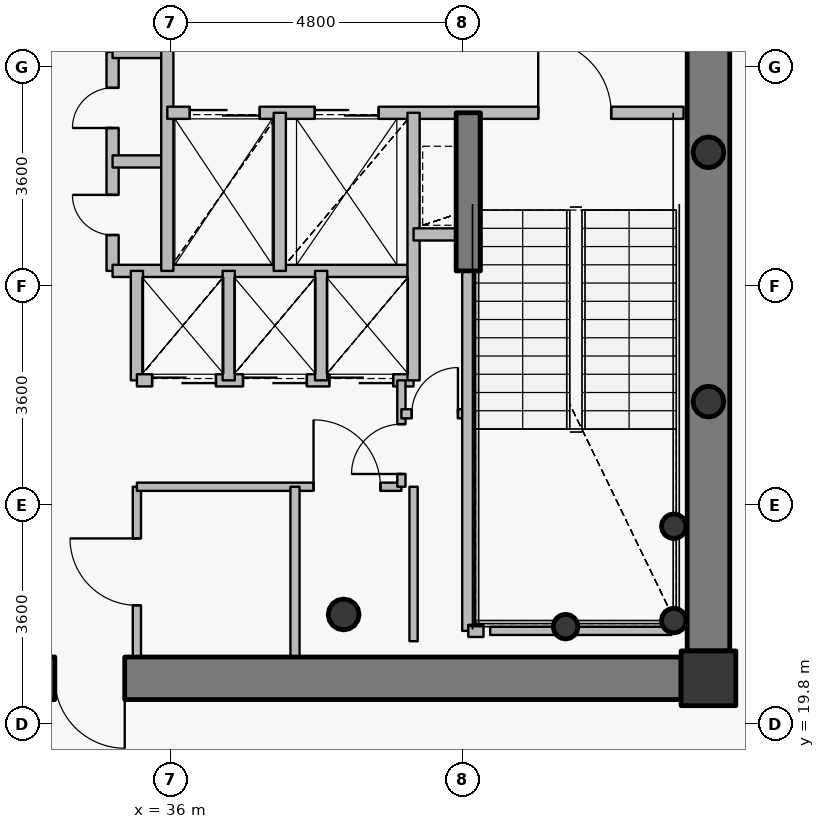
"""IFC4 building model, lengths in metres.
Left out: names, types, materials, properties, quantities, classifications, styles, units other than length and angle.
Written with IfcOpenShell. Run it as: python <this file> out.ifc"""

import sys

from ifc_helpers import new_model, si_unit, direction, frame, frame_2d, origin, origin_2d, place, context, subcontext, project, spatial, rectangle, hollow_circle, extrude, source, transform, mapped, element, fill, save


model = new_model("IFC4")
c1 = context("Model", 3, precision=1e-05, world=origin(), true_north=direction((0.0, 1.0)))
c2 = subcontext(c1, "Body", "Model", "MODEL_VIEW")
j1 = project(units=[si_unit("LENGTHUNIT", "METRE"), si_unit("PLANEANGLEUNIT", "RADIAN")], contexts=[c1])
p1 = place(None, origin())
s1 = spatial("IfcSite", under=j1, at=p1, CompositionType="ELEMENT")
p2 = place(p1, origin())
s2 = spatial("IfcBuilding", under=s1, at=p2, CompositionType="ELEMENT")
p3 = place(p2, frame((0.0, 0.0, 339.2)))
s3 = spatial("IfcBuildingStorey", under=s2, at=p3, CompositionType="ELEMENT", Elevation=339.2)
p4 = place(p3, frame((44.85, 20.55, 0.0), z_axis=(0.0, 0.0, 1.0), x_axis=(1.0, 0.0, 0.0)))
e1 = element("IfcColumn", 1, at=p4, inside=s3, PredefinedType="COLUMN", context=c2, shape_type="SweptSolid", body=[
    extrude(rectangle(XDim=0.9, YDim=0.9, at=origin_2d()), origin(), (0.0, 0.0, 1.0), 3.8),
])
p5 = place(p3, frame((38.85, 21.6, 0.0), z_axis=(0.0, 0.0, 1.0), x_axis=(1.0, 0.0, 0.0)))
e2 = element("IfcColumn", 2, at=p5, inside=s3, PredefinedType="COLUMN", context=c2, shape_type="SweptSolid", body=[
    extrude(hollow_circle(Radius=0.254, WallThickness=0.02, at=origin_2d()), origin(), (0.0, 0.0, 1.0), 3.8),
])
for number, where, z_axis, x_axis in (
    (3, (44.28, 21.5, 0.0), (0.0, 0.0, 1.0), (1.0, 0.0, 0.0)),
    (4, (44.28, 23.05, 0.0), (0.0, 0.0, 1.0), (1.0, 0.0, 0.0)),
    (5, (42.5, 21.4, 0.0), (0.0, 0.0, 1.0), (1.0, 0.0, 0.0)),
):
    element("IfcColumn", number, at=place(p3, frame(where, z_axis=z_axis, x_axis=x_axis)), inside=s3, PredefinedType="COLUMN", context=c2, shape_type="SweptSolid", body=[
        extrude(hollow_circle(Radius=0.203, WallThickness=0.016, at=origin_2d()), origin(), (0.0, 0.0, 1.0), 3.8),
    ])
p6 = place(p3, frame((44.85, 33.0, 0.0), z_axis=(0.0, 0.0, 1.0), x_axis=(0.0, -1.0, 0.0)))
e6 = element("IfcWall", 6, at=p6, inside=s3, PredefinedType="SHEAR", context=c2, shape_type="SweptSolid", body=[
    extrude(rectangle(XDim=12.0, YDim=0.7, at=frame_2d((6.0, 0.0))), origin(), (0.0, 0.0, 1.0), 3.1),
])
p7 = place(p3, frame((44.4, 20.55, 0.0), z_axis=(0.0, 0.0, 1.0), x_axis=(-1.0, 0.0, 0.0)))
e7 = element("IfcWall", 7, at=p7, inside=s3, PredefinedType="SHEAR", context=c2, shape_type="SweptSolid", body=[
    extrude(rectangle(XDim=16.8, YDim=0.7, at=frame_2d((8.4, 0.0))), origin(), (0.0, 0.0, 1.0), 3.1),
])
p8 = place(p7, frame((13.0, 0.0, 0.0)))
e8 = element("IfcOpeningElement", 8, at=p8, cuts=e7, PredefinedType="OPENING", context=c2, shape_type="SweptSolid", body=[
    extrude(rectangle(XDim=1.15, YDim=2.15, at=origin_2d()), frame((0.575, 0.36, 1.075), z_axis=(0.0, -1.0, 0.0), x_axis=(1.0, 0.0, 0.0)), (0.0, 0.0, 1.0), 0.72),
])
p9 = place(p7, frame((9.15, 0.0, 0.0)))
e9 = element("IfcOpeningElement", 9, at=p9, cuts=e7, PredefinedType="OPENING", context=c2, shape_type="SweptSolid", body=[
    extrude(rectangle(XDim=1.15, YDim=2.15, at=origin_2d()), frame((0.575, 0.36, 1.075), z_axis=(0.0, -1.0, 0.0), x_axis=(1.0, 0.0, 0.0)), (0.0, 0.0, 1.0), 0.72),
])
p10 = place(p3, frame((40.9, 27.25, 0.0), z_axis=(0.0, 0.0, 1.0), x_axis=(0.0, 1.0, 0.0)))
e10 = element("IfcWall", 10, at=p10, inside=s3, PredefinedType="SHEAR", context=c2, shape_type="SweptSolid", body=[
    extrude(rectangle(XDim=2.6, YDim=0.4, at=frame_2d((1.3, 0.0))), origin(), (0.0, 0.0, 1.0), 3.15),
])
for number, where, z_axis, x_axis in (
    (11, (44.85, 25.1, 0.0), (0.0, 0.0, 1.0), (1.0, 0.0, 0.0)),
    (12, (44.85, 29.2, 0.0), (0.0, 0.0, 1.0), (1.0, 0.0, 0.0)),
):
    element("IfcColumn", number, at=place(p3, frame(where, z_axis=z_axis, x_axis=x_axis)), inside=s3, PredefinedType="COLUMN", context=c2, shape_type="SweptSolid", body=[
        extrude(hollow_circle(Radius=0.254, WallThickness=0.02, at=origin_2d()), origin(), (0.0, 0.0, 1.0), 3.8),
    ])
p11 = place(p3, frame((35.05, 27.25, 0.0), z_axis=(0.0, 0.0, 1.0), x_axis=(0.0, 1.0, 0.0)))
e13 = element("IfcWall", 13, at=p11, inside=s3, PredefinedType="PARTITIONING", context=c2, shape_type="SweptSolid", body=[
    extrude(rectangle(XDim=3.6, YDim=0.2, at=frame_2d((1.8, 0.0))), origin(), (0.0, 0.0, 1.0), 3.55),
])
p12 = place(p11, frame((0.59, 0.0, 0.0)))
e14 = element("IfcOpeningElement", 14, at=p12, cuts=e13, PredefinedType="OPENING", context=c2, shape_type="SweptSolid", body=[
    extrude(rectangle(XDim=0.66, YDim=2.05, at=origin_2d()), frame((0.33, 0.11, 1.025), z_axis=(0.0, -1.0, 0.0), x_axis=(1.0, 0.0, 0.0)), (0.0, 0.0, 1.0), 0.22),
])
p13 = place(p11, frame((2.35, 0.0, 0.0)))
e15 = element("IfcOpeningElement", 15, at=p13, cuts=e13, PredefinedType="OPENING", context=c2, shape_type="SweptSolid", body=[
    extrude(rectangle(XDim=0.66, YDim=2.05, at=origin_2d()), frame((0.33, 0.11, 1.025), z_axis=(0.0, -1.0, 0.0), x_axis=(1.0, 0.0, 0.0)), (0.0, 0.0, 1.0), 0.22),
])
p14 = place(p3, frame((35.05, 27.25, 0.0), z_axis=(0.0, 0.0, 1.0), x_axis=(1.0, 0.0, 0.0)))
e16 = element("IfcWall", 16, at=p14, inside=s3, PredefinedType="PARTITIONING", context=c2, shape_type="SweptSolid", body=[
    extrude(rectangle(XDim=4.95, YDim=0.2, at=frame_2d((2.475, 0.0))), origin(), (0.0, 0.0, 1.0), 3.135),
])
for number, where, z_axis, x_axis in (
    (17, (35.05, 29.05, 0.0), (0.0, 0.0, 1.0), (1.0, 0.0, 0.0)),
    (18, (35.05, 30.85, 0.0), (0.0, 0.0, 1.0), (1.0, 0.0, 0.0)),
):
    element("IfcWall", number, at=place(p3, frame(where, z_axis=z_axis, x_axis=x_axis)), inside=s3, PredefinedType="PARTITIONING", context=c2, shape_type="SweptSolid", body=[
        extrude(rectangle(XDim=0.9, YDim=0.2, at=frame_2d((0.45, 0.0))), origin(), (0.0, 0.0, 1.0), 3.55),
    ])
p15 = place(p3, frame((35.45, 20.9, 0.0), z_axis=(0.0, 0.0, 1.0), x_axis=(0.0, 1.0, 0.0)))
e19 = element("IfcWall", 19, at=p15, inside=s3, PredefinedType="PARTITIONING", context=c2, shape_type="SweptSolid", body=[
    extrude(rectangle(XDim=2.8, YDim=0.135, at=frame_2d((1.4, 0.0))), origin(), (0.0, 0.0, 1.0), 3.135),
])
p16 = place(p15, frame((0.85, 0.0, 0.0)))
e20 = element("IfcOpeningElement", 20, at=p16, cuts=e19, PredefinedType="OPENING", context=c2, shape_type="SweptSolid", body=[
    extrude(rectangle(XDim=1.1, YDim=2.15, at=origin_2d()), frame((0.55, 0.078, 1.075), z_axis=(0.0, -1.0, 0.0), x_axis=(1.0, 0.0, 0.0)), (0.0, 0.0, 1.0), 0.155),
])
p17 = place(p3, frame((35.45, 23.7, 0.0), z_axis=(0.0, 0.0, 1.0), x_axis=(1.0, 0.0, 0.0)))
e21 = element("IfcWall", 21, at=p17, inside=s3, PredefinedType="PARTITIONING", context=c2, shape_type="SweptSolid", body=[
    extrude(rectangle(XDim=4.35, YDim=0.135, at=frame_2d((2.175, 0.0))), origin(), (0.0, 0.0, 1.0), 3.135),
])
p18 = place(p17, frame((2.905, 0.0, 0.0)))
e22 = element("IfcOpeningElement", 22, at=p18, cuts=e21, PredefinedType="OPENING", context=c2, shape_type="SweptSolid", body=[
    extrude(rectangle(XDim=1.1, YDim=2.15, at=origin_2d()), frame((0.55, 0.078, 1.075), z_axis=(0.0, -1.0, 0.0), x_axis=(1.0, 0.0, 0.0)), (0.0, 0.0, 1.0), 0.155),
])
p19 = place(p3, frame((35.45, 25.45, 0.0), z_axis=(0.0, 0.0, 1.0), x_axis=(0.0, 1.0, 0.0)))
e23 = element("IfcWall", 23, at=p19, inside=s3, PredefinedType="PARTITIONING", context=c2, shape_type="SweptSolid", body=[
    extrude(rectangle(XDim=1.8, YDim=0.2, at=frame_2d((0.9, 0.0))), origin(), (0.0, 0.0, 1.0), 3.55),
])
p20 = place(p3, frame((35.45, 25.45, 0.0), z_axis=(0.0, 0.0, 1.0), x_axis=(1.0, 0.0, 0.0)))
e24 = element("IfcWall", 24, at=p20, inside=s3, PredefinedType="PARTITIONING", context=c2, shape_type="SweptSolid", body=[
    extrude(rectangle(XDim=4.55, YDim=0.2, at=frame_2d((2.275, 0.0))), origin(), (0.0, 0.0, 1.0), 3.135),
])
p21 = place(p20, frame((0.25, 0.0, 0.0)))
e25 = element("IfcOpeningElement", 25, at=p21, cuts=e24, PredefinedType="OPENING", context=c2, shape_type="SweptSolid", body=[
    extrude(rectangle(XDim=1.05, YDim=2.15, at=origin_2d()), frame((0.525, 0.11, 1.075), z_axis=(0.0, -1.0, 0.0), x_axis=(1.0, 0.0, 0.0)), (0.0, 0.0, 1.0), 0.22),
])
p22 = place(p20, frame((1.745, 0.0, 0.0)))
e26 = element("IfcOpeningElement", 26, at=p22, cuts=e24, PredefinedType="OPENING", context=c2, shape_type="SweptSolid", body=[
    extrude(rectangle(XDim=1.05, YDim=2.15, at=origin_2d()), frame((0.525, 0.11, 1.075), z_axis=(0.0, -1.0, 0.0), x_axis=(1.0, 0.0, 0.0)), (0.0, 0.0, 1.0), 0.22),
])
p23 = place(p20, frame((3.165, 0.0, 0.0)))
e27 = element("IfcOpeningElement", 27, at=p23, cuts=e24, PredefinedType="OPENING", context=c2, shape_type="SweptSolid", body=[
    extrude(rectangle(XDim=1.05, YDim=2.15, at=origin_2d()), frame((0.525, 0.11, 1.075), z_axis=(0.0, -1.0, 0.0), x_axis=(1.0, 0.0, 0.0)), (0.0, 0.0, 1.0), 0.22),
])
p24 = place(p3, frame((35.95, 27.25, 0.0), z_axis=(0.0, 0.0, 1.0), x_axis=(0.0, 1.0, 0.0)))
e28 = element("IfcWall", 28, at=p24, inside=s3, PredefinedType="PARTITIONING", context=c2, shape_type="SweptSolid", body=[
    extrude(rectangle(XDim=3.8, YDim=0.2, at=frame_2d((1.9, 0.0))), origin(), (0.0, 0.0, 1.0), 3.55),
])
p25 = place(p3, frame((35.95, 29.85, 0.0), z_axis=(0.0, 0.0, 1.0), x_axis=(1.0, 0.0, 0.0)))
e29 = element("IfcWall", 29, at=p25, inside=s3, PredefinedType="PARTITIONING", context=c2, shape_type="SweptSolid", body=[
    extrude(rectangle(XDim=8.49, YDim=0.2, at=frame_2d((4.245, 0.0))), origin(), (0.0, 0.0, 1.0), 3.135),
])
p26 = place(p25, frame((6.1, 0.0, 0.0)))
e30 = element("IfcOpeningElement", 30, at=p26, cuts=e29, PredefinedType="OPENING", context=c2, shape_type="SweptSolid", body=[
    extrude(rectangle(XDim=1.2, YDim=2.15, at=origin_2d()), frame((0.6, 0.11, 1.075), z_axis=(0.0, -1.0, 0.0), x_axis=(1.0, 0.0, 0.0)), (0.0, 0.0, 1.0), 0.22),
])
p27 = place(p25, frame((0.37, 0.0, 0.0)))
e31 = element("IfcOpeningElement", 31, at=p27, cuts=e29, PredefinedType="OPENING", context=c2, shape_type="SweptSolid", body=[
    extrude(rectangle(XDim=1.15, YDim=2.15, at=origin_2d()), frame((0.575, 0.11, 1.075), z_axis=(0.0, -1.0, 0.0), x_axis=(1.0, 0.0, 0.0)), (0.0, 0.0, 1.0), 0.22),
])
p28 = place(p25, frame((2.425, 0.0, 0.0)))
e32 = element("IfcOpeningElement", 32, at=p28, cuts=e29, PredefinedType="OPENING", context=c2, shape_type="SweptSolid", body=[
    extrude(rectangle(XDim=1.05, YDim=2.15, at=origin_2d()), frame((0.525, 0.11, 1.075), z_axis=(0.0, -1.0, 0.0), x_axis=(1.0, 0.0, 0.0)), (0.0, 0.0, 1.0), 0.22),
])
p29 = place(p3, frame((36.96, 25.45, 0.0), z_axis=(0.0, 0.0, 1.0), x_axis=(0.0, 1.0, 0.0)))
e33 = element("IfcWall", 33, at=p29, inside=s3, PredefinedType="PARTITIONING", context=c2, shape_type="SweptSolid", body=[
    extrude(rectangle(XDim=1.8, YDim=0.2, at=frame_2d((0.9, 0.0))), origin(), (0.0, 0.0, 1.0), 3.55),
])
p30 = place(p3, frame((37.8, 27.25, 0.0), z_axis=(0.0, 0.0, 1.0), x_axis=(0.0, 1.0, 0.0)))
e34 = element("IfcWall", 34, at=p30, inside=s3, PredefinedType="PARTITIONING", context=c2, shape_type="SweptSolid", body=[
    extrude(rectangle(XDim=2.6, YDim=0.2, at=frame_2d((1.3, 0.0))), origin(), (0.0, 0.0, 1.0), 3.55),
])
p31 = place(p3, frame((38.05, 20.38, 0.0), z_axis=(0.0, 0.0, 1.0), x_axis=(0.0, 1.0, 0.0)))
e35 = element("IfcWall", 35, at=p31, inside=s3, PredefinedType="PARTITIONING", context=c2, shape_type="SweptSolid", body=[
    extrude(rectangle(XDim=3.32, YDim=0.15, at=frame_2d((1.66, 0.0))), origin(), (0.0, 0.0, 1.0), 3.085),
])
p32 = place(p3, frame((38.48, 25.45, 0.0), z_axis=(0.0, 0.0, 1.0), x_axis=(0.0, 1.0, 0.0)))
e36 = element("IfcWall", 36, at=p32, inside=s3, PredefinedType="PARTITIONING", context=c2, shape_type="SweptSolid", body=[
    extrude(rectangle(XDim=1.8, YDim=0.2, at=frame_2d((0.9, 0.0))), origin(), (0.0, 0.0, 1.0), 3.55),
])
p33 = place(p3, frame((39.8, 23.7, 0.0), z_axis=(0.0, 0.0, 1.0), x_axis=(0.0, 1.0, 0.0)))
e37 = element("IfcWall", 37, at=p33, inside=s3, PredefinedType="PARTITIONING", context=c2, shape_type="SweptSolid", body=[
    extrude(rectangle(XDim=1.75, YDim=0.135, at=frame_2d((0.875, 0.0))), origin(), (0.0, 0.0, 1.0), 3.55),
])
p34 = place(p33, frame((0.21, 0.0, 0.0)))
e38 = element("IfcOpeningElement", 38, at=p34, cuts=e37, PredefinedType="OPENING", context=c2, shape_type="SweptSolid", body=[
    extrude(rectangle(XDim=0.82, YDim=2.1, at=origin_2d()), frame((0.41, 0.078, 1.05), z_axis=(0.0, -1.0, 0.0), x_axis=(1.0, 0.0, 0.0)), (0.0, 0.0, 1.0), 0.155),
])
p35 = place(p3, frame((39.8, 24.9, 0.0), z_axis=(0.0, 0.0, 1.0), x_axis=(1.0, 0.0, 0.0)))
e39 = element("IfcWall", 39, at=p35, inside=s3, PredefinedType="PARTITIONING", context=c2, shape_type="SweptSolid", body=[
    extrude(rectangle(XDim=1.1, YDim=0.15, at=frame_2d((0.55, 0.0))), origin(), (0.0, 0.0, 1.0), 3.55),
])
p36 = place(p35, frame((0.17, 0.0, 0.0)))
e40 = element("IfcOpeningElement", 40, at=p36, cuts=e39, PredefinedType="OPENING", context=c2, shape_type="SweptSolid", body=[
    extrude(rectangle(XDim=0.76, YDim=2.1, at=origin_2d()), frame((0.38, 0.085, 1.05), z_axis=(0.0, -1.0, 0.0), x_axis=(1.0, 0.0, 0.0)), (0.0, 0.0, 1.0), 0.17),
])
p37 = place(p3, frame((40.0, 25.45, 0.0), z_axis=(0.0, 0.0, 1.0), x_axis=(0.0, 1.0, 0.0)))
e41 = element("IfcWall", 41, at=p37, inside=s3, PredefinedType="PARTITIONING", context=c2, shape_type="SweptSolid", body=[
    extrude(rectangle(XDim=4.4, YDim=0.2, at=frame_2d((2.2, 0.0))), origin(), (0.0, 0.0, 1.0), 3.55),
])
p38 = place(p3, frame((40.0, 27.85, 0.0), z_axis=(0.0, 0.0, 1.0), x_axis=(1.0, 0.0, 0.0)))
e42 = element("IfcWall", 42, at=p38, inside=s3, PredefinedType="PARTITIONING", context=c2, shape_type="SweptSolid", body=[
    extrude(rectangle(XDim=0.9, YDim=0.2, at=frame_2d((0.45, 0.0))), origin(), (0.0, 0.0, 1.0), 3.55),
])
p39 = place(p3, frame((40.9, 21.33, 0.0), z_axis=(0.0, 0.0, 1.0), x_axis=(0.0, 1.0, 0.0)))
e43 = element("IfcWall", 43, at=p39, inside=s3, PredefinedType="PARTITIONING", context=c2, shape_type="SweptSolid", body=[
    extrude(rectangle(XDim=5.91, YDim=0.2, at=frame_2d((2.955, 0.0))), origin(), (0.0, 0.0, 1.0), 3.085),
])
p40 = place(p3, frame((40.9, 21.33, 0.0), z_axis=(0.0, 0.0, 1.0), x_axis=(1.0, 0.0, 0.0)))
e44 = element("IfcWall", 44, at=p40, inside=s3, PredefinedType="PARTITIONING", context=c2, shape_type="SweptSolid", body=[
    extrude(rectangle(XDim=0.25, YDim=0.2, at=frame_2d((0.125, 0.0))), origin(), (0.0, 0.0, 1.0), 3.085),
])
p41 = place(p3, frame((44.24, 21.33, 0.0), z_axis=(0.0, 0.0, 1.0), x_axis=(-1.0, 0.0, 0.0)))
e45 = element("IfcWall", 45, at=p41, inside=s3, PredefinedType="PARTITIONING", context=c2, shape_type="SweptSolid", body=[
    extrude(rectangle(XDim=2.98, YDim=0.135, at=frame_2d((1.49, 0.0))), origin(), (0.0, 0.0, 1.0), 3.085),
])
p42 = place(p3, frame((40.0, 23.7, 0.0), z_axis=(0.0, 0.0, 1.0), x_axis=(0.0, -1.0, 0.0)))
e46 = element("IfcWall", 46, at=p42, inside=s3, PredefinedType="PARTITIONING", context=c2, shape_type="SweptSolid", body=[
    extrude(rectangle(XDim=2.54, YDim=0.135, at=frame_2d((1.27, 0.0))), origin(), (0.0, 0.0, 1.0), 3.085),
])
p43 = place(p3, frame((44.41, 20.2, 0.0), z_axis=(0.0, 0.0, 1.0), x_axis=(1.0, 0.0, 0.0)))
e47 = element("IfcWall", 47, at=p43, inside=s3, PredefinedType="PARTITIONING", context=c2, shape_type="SweptSolid", body=[
    extrude(rectangle(XDim=0.79, YDim=0.135, at=frame_2d((0.395, 0.0))), origin(), (0.0, 0.0, 1.0), 2.25),
])
p44 = place(p3, frame((45.2, 20.508, 0.0), z_axis=(0.0, 0.0, 1.0), x_axis=(0.0, 1.0, 0.0)))
e48 = element("IfcWall", 48, at=p44, inside=s3, PredefinedType="PARTITIONING", context=c2, shape_type="SweptSolid", body=[
    extrude(rectangle(XDim=0.482, YDim=0.135, at=frame_2d((0.241, 0.0))), origin(), (0.0, 0.0, 1.0), 3.55),
])
m1 = source(origin(), c2, "Body", "SweptSolid", [
    extrude(rectangle(XDim=1.15, YDim=2.15, at=origin_2d()), frame((0.575, 0.025, 1.075), z_axis=(0.0, -1.0, 0.0), x_axis=(1.0, 0.0, 0.0)), (0.0, 0.0, 1.0), 0.05),
])
p45 = place(p9, origin())
e49 = element("IfcDoor", 49, at=p45, inside=s3, OperationType="SINGLE_SWING_LEFT", PredefinedType="DOOR", context=c2, shape_type="MappedRepresentation", body=[
    mapped(m1, transform((0.0, 0.0, 0.0), x_axis=(1.0, 0.0, 0.0), y_axis=(0.0, 1.0, 0.0), z_axis=(0.0, 0.0, 1.0), scale=1.0)),
])
fill(e9, e49)
m2 = source(origin(), c2, "Body", "SweptSolid", [
    extrude(rectangle(XDim=1.2, YDim=2.15, at=origin_2d()), frame((0.6, 0.025, 1.075), z_axis=(0.0, -1.0, 0.0), x_axis=(1.0, 0.0, 0.0)), (0.0, 0.0, 1.0), 0.05),
])
p46 = place(p26, origin())
e50 = element("IfcDoor", 50, at=p46, inside=s3, OperationType="SINGLE_SWING_LEFT", PredefinedType="DOOR", context=c2, shape_type="MappedRepresentation", body=[
    mapped(m2, transform((0.0, 0.0, 0.0), x_axis=(1.0, 0.0, 0.0), y_axis=(0.0, 1.0, 0.0), z_axis=(0.0, 0.0, 1.0), scale=1.0)),
])
fill(e30, e50)
m3 = source(origin(), c2, "Body", "SweptSolid", [
    extrude(rectangle(XDim=1.15, YDim=2.15, at=origin_2d()), frame((0.575, 0.025, 1.075), z_axis=(0.0, -1.0, 0.0), x_axis=(1.0, 0.0, 0.0)), (0.0, 0.0, 1.0), 0.05),
])
p47 = place(p27, origin())
e51 = element("IfcDoor", 51, at=p47, inside=s3, OperationType="DOUBLE_DOOR_SLIDING", PredefinedType="USERDEFINED", context=c2, shape_type="MappedRepresentation", body=[
    mapped(m3, transform((0.0, 0.0, 0.0), x_axis=(1.0, 0.0, 0.0), y_axis=(0.0, 1.0, 0.0), z_axis=(0.0, 0.0, 1.0), scale=1.0)),
])
fill(e31, e51)
m4 = source(origin(), c2, "Body", "SweptSolid", [
    extrude(rectangle(XDim=1.05, YDim=2.15, at=origin_2d()), frame((0.525, 0.025, 1.075), z_axis=(0.0, -1.0, 0.0), x_axis=(1.0, 0.0, 0.0)), (0.0, 0.0, 1.0), 0.05),
])
p48 = place(p28, origin())
e52 = element("IfcDoor", 52, at=p48, inside=s3, OperationType="DOUBLE_DOOR_SLIDING", PredefinedType="USERDEFINED", context=c2, shape_type="MappedRepresentation", body=[
    mapped(m4, transform((0.0, 0.0, 0.0), x_axis=(1.0, 0.0, 0.0), y_axis=(0.0, 1.0, 0.0), z_axis=(0.0, 0.0, 1.0), scale=1.0)),
])
fill(e32, e52)
p49 = place(p21, origin())
e53 = element("IfcDoor", 53, at=p49, inside=s3, OperationType="DOUBLE_DOOR_SLIDING", PredefinedType="USERDEFINED", context=c2, shape_type="MappedRepresentation", body=[
    mapped(m4, transform((0.0, 0.0, 0.0), x_axis=(1.0, 0.0, 0.0), y_axis=(0.0, 1.0, 0.0), z_axis=(0.0, 0.0, 1.0), scale=1.0)),
])
fill(e25, e53)
p50 = place(p22, origin())
e54 = element("IfcDoor", 54, at=p50, inside=s3, OperationType="DOUBLE_DOOR_SLIDING", PredefinedType="USERDEFINED", context=c2, shape_type="MappedRepresentation", body=[
    mapped(m4, transform((0.0, 0.0, 0.0), x_axis=(1.0, 0.0, 0.0), y_axis=(0.0, 1.0, 0.0), z_axis=(0.0, 0.0, 1.0), scale=1.0)),
])
fill(e26, e54)
p51 = place(p23, origin())
e55 = element("IfcDoor", 55, at=p51, inside=s3, OperationType="DOUBLE_DOOR_SLIDING", PredefinedType="USERDEFINED", context=c2, shape_type="MappedRepresentation", body=[
    mapped(m4, transform((0.0, 0.0, 0.0), x_axis=(1.0, 0.0, 0.0), y_axis=(0.0, 1.0, 0.0), z_axis=(0.0, 0.0, 1.0), scale=1.0)),
])
fill(e27, e55)
m5 = source(origin(), c2, "Body", "SweptSolid", [
    extrude(rectangle(XDim=0.66, YDim=2.05, at=origin_2d()), frame((0.33, 0.025, 1.025), z_axis=(0.0, -1.0, 0.0), x_axis=(1.0, 0.0, 0.0)), (0.0, 0.0, 1.0), 0.05),
])
p52 = place(p12, origin())
e56 = element("IfcDoor", 56, at=p52, inside=s3, OperationType="SINGLE_SWING_RIGHT", PredefinedType="USERDEFINED", context=c2, shape_type="MappedRepresentation", body=[
    mapped(m5, transform((0.0, 0.0, 0.0), x_axis=(1.0, 0.0, 0.0), y_axis=(0.0, 1.0, 0.0), z_axis=(0.0, 0.0, 1.0), scale=1.0)),
])
fill(e14, e56)
p53 = place(p13, origin())
e57 = element("IfcDoor", 57, at=p53, inside=s3, OperationType="SINGLE_SWING_LEFT", PredefinedType="USERDEFINED", context=c2, shape_type="MappedRepresentation", body=[
    mapped(m5, transform((0.0, 0.0, 0.0), x_axis=(1.0, 0.0, 0.0), y_axis=(0.0, 1.0, 0.0), z_axis=(0.0, 0.0, 1.0), scale=1.0)),
])
fill(e15, e57)
m6 = source(origin(), c2, "Body", "SweptSolid", [
    extrude(rectangle(XDim=1.1, YDim=2.15, at=origin_2d()), frame((0.55, 0.025, 1.075), z_axis=(0.0, -1.0, 0.0), x_axis=(1.0, 0.0, 0.0)), (0.0, 0.0, 1.0), 0.05),
])
p54 = place(p16, origin())
e58 = element("IfcDoor", 58, at=p54, inside=s3, OperationType="SINGLE_SWING_RIGHT", PredefinedType="DOOR", context=c2, shape_type="MappedRepresentation", body=[
    mapped(m6, transform((0.0, 0.0, 0.0), x_axis=(1.0, 0.0, 0.0), y_axis=(0.0, 1.0, 0.0), z_axis=(0.0, 0.0, 1.0), scale=1.0)),
])
fill(e20, e58)
p55 = place(p18, origin())
e59 = element("IfcDoor", 59, at=p55, inside=s3, OperationType="SINGLE_SWING_LEFT", PredefinedType="DOOR", context=c2, shape_type="MappedRepresentation", body=[
    mapped(m6, transform((0.0, 0.0, 0.0), x_axis=(1.0, 0.0, 0.0), y_axis=(0.0, 1.0, 0.0), z_axis=(0.0, 0.0, 1.0), scale=1.0)),
])
fill(e22, e59)
m7 = source(origin(), c2, "Body", "SweptSolid", [
    extrude(rectangle(XDim=0.82, YDim=2.1, at=origin_2d()), frame((0.41, 0.025, 1.05), z_axis=(0.0, -1.0, 0.0), x_axis=(1.0, 0.0, 0.0)), (0.0, 0.0, 1.0), 0.05),
])
p56 = place(p34, origin())
e60 = element("IfcDoor", 60, at=p56, inside=s3, OperationType="SINGLE_SWING_LEFT", PredefinedType="DOOR", context=c2, shape_type="MappedRepresentation", body=[
    mapped(m7, transform((0.0, 0.0, 0.0), x_axis=(1.0, 0.0, 0.0), y_axis=(0.0, 1.0, 0.0), z_axis=(0.0, 0.0, 1.0), scale=1.0)),
])
fill(e38, e60)
m8 = source(origin(), c2, "Body", "SweptSolid", [
    extrude(rectangle(XDim=0.76, YDim=2.1, at=origin_2d()), frame((0.38, 0.025, 1.05), z_axis=(0.0, -1.0, 0.0), x_axis=(1.0, 0.0, 0.0)), (0.0, 0.0, 1.0), 0.05),
])
p57 = place(p36, origin())
e61 = element("IfcDoor", 61, at=p57, inside=s3, OperationType="SINGLE_SWING_RIGHT", PredefinedType="DOOR", context=c2, shape_type="MappedRepresentation", body=[
    mapped(m8, transform((0.0, 0.0, 0.0), x_axis=(1.0, 0.0, 0.0), y_axis=(0.0, 1.0, 0.0), z_axis=(0.0, 0.0, 1.0), scale=1.0)),
])
fill(e40, e61)
save(model, sys.argv[1])
